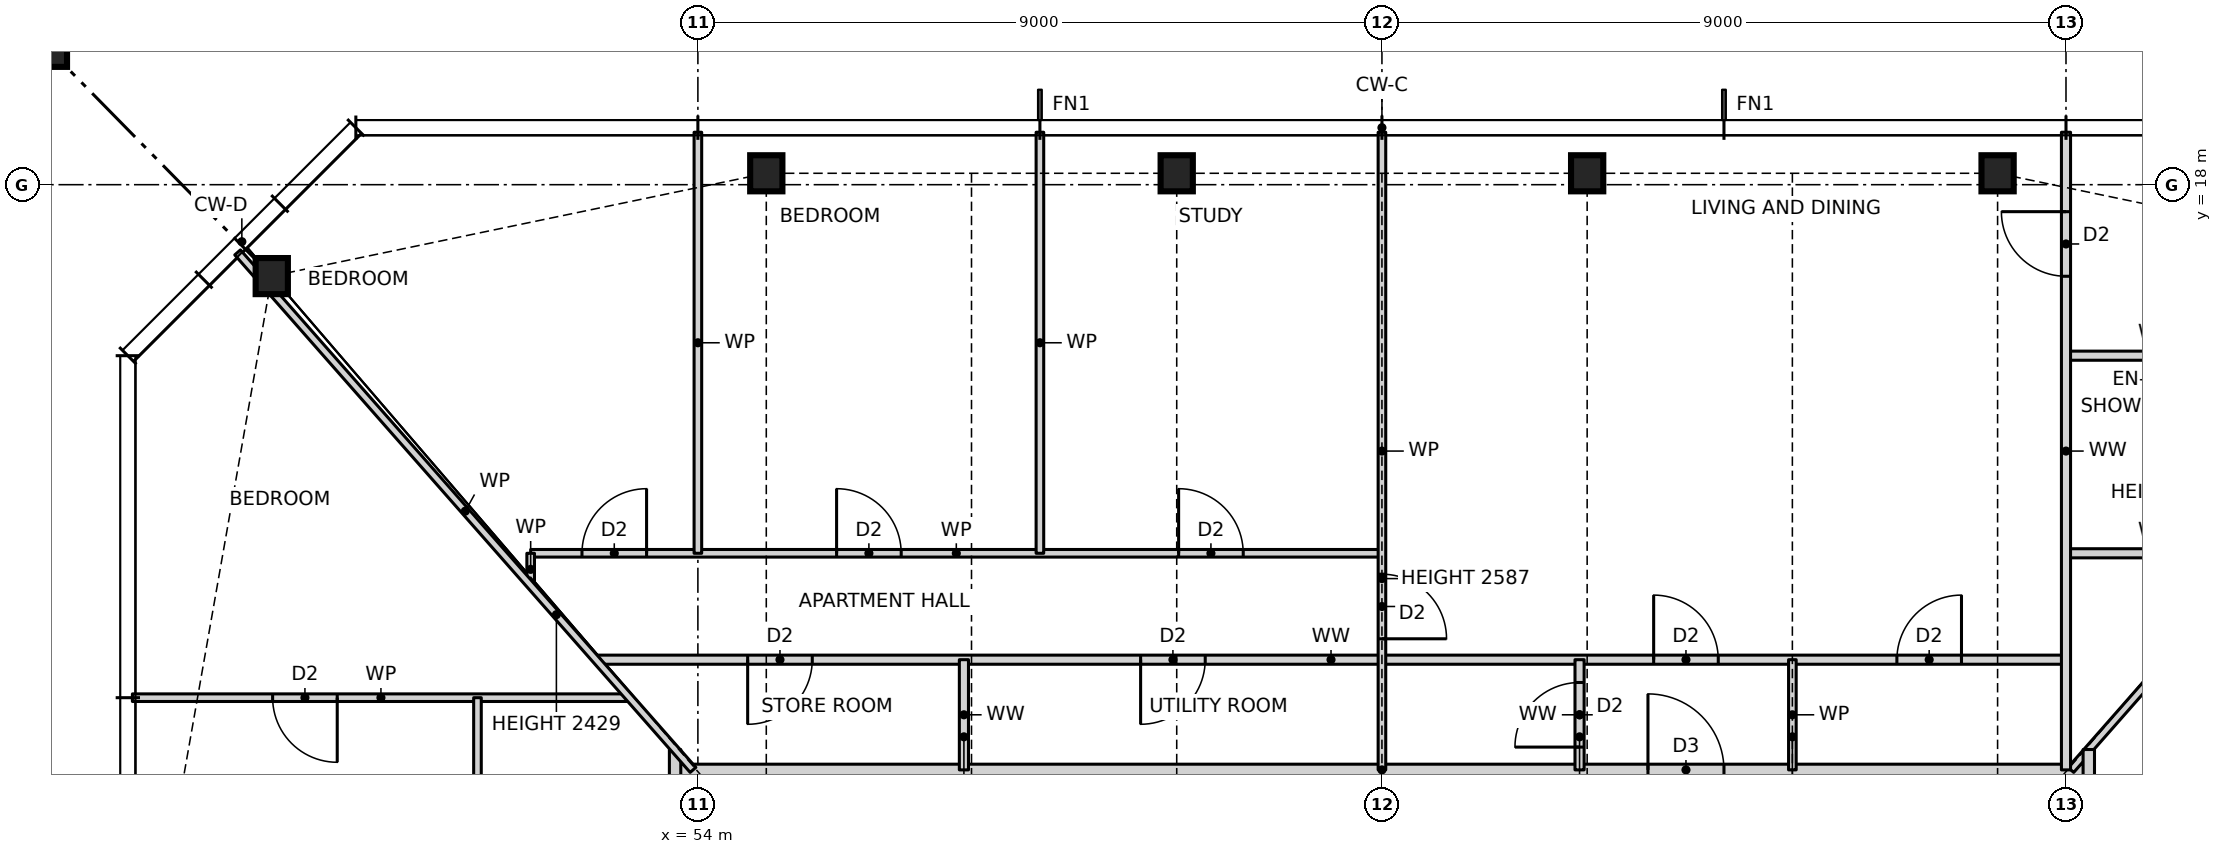
"""IFC4 building model, lengths in metres.
Left out: names, types, materials, properties, quantities, classifications, styles, units other than length and angle.
Written with IfcOpenShell. Run it as: python <this file> out.ifc"""

import sys

from ifc_helpers import new_model, si_unit, direction, frame, frame_2d, origin, origin_2d, place, context, subcontext, project, spatial, rectangle, hollow_rectangle, i_section, extrude, element, fill, save


model = new_model("IFC4")
c1 = context("Model", 3, precision=1e-05, world=origin(), true_north=direction((0.0, 1.0)))
c2 = subcontext(c1, "Body", "Model", "MODEL_VIEW")
j1 = project(units=[si_unit("LENGTHUNIT", "METRE"), si_unit("PLANEANGLEUNIT", "RADIAN")], contexts=[c1])
p1 = place(None, origin())
s1 = spatial("IfcSite", under=j1, at=p1, CompositionType="ELEMENT")
p2 = place(p1, origin())
s2 = spatial("IfcBuilding", under=s1, at=p2, CompositionType="ELEMENT")
p3 = place(p2, frame((0.0, 0.0, 46.5)))
s3 = spatial("IfcBuildingStorey", under=s2, at=p3, CompositionType="ELEMENT", Elevation=46.5)
for number, where, z_axis, x_axis in (
    (1, (71.1, 18.15, 0.0), (0.0, 0.0, 1.0), (1.0, 0.0, 0.0)),
    (2, (65.7, 18.15, 0.0), (0.0, 0.0, 1.0), (1.0, 0.0, 0.0)),
    (3, (60.3, 18.15, 0.0), (0.0, 0.0, 1.0), (1.0, 0.0, 0.0)),
    (4, (54.9, 18.15, 0.0), (0.0, 0.0, 1.0), (1.0, 0.0, 0.0)),
    (5, (48.394, 16.797, 0.0), (0.0, 0.0, 1.0), (1.0, 0.0, 0.0)),
):
    element("IfcColumn", number, at=place(p3, frame(where, z_axis=z_axis, x_axis=x_axis)), inside=s3, PredefinedType="COLUMN", context=c2, shape_type="SweptSolid", body=[
        extrude(i_section(OverallWidth=0.424, OverallDepth=0.475, WebThickness=0.048, FlangeThickness=0.077, at=origin_2d()), origin(), (0.0, 0.0, 1.0), 3.5),
    ])
p4 = place(p3, frame((45.1, 20.15, 0.0), z_axis=(0.0, 0.0, 1.0), x_axis=(1.0, 0.0, 0.0)))
e6 = element("IfcColumn", 6, at=p4, inside=s3, PredefinedType="COLUMN", context=c2, shape_type="SweptSolid", body=[
    extrude(hollow_rectangle(XDim=1.2, YDim=1.2, WallThickness=0.07, at=origin_2d()), origin(), (0.0, 0.0, 1.0), 3.5),
])
p5 = place(p3, frame((53.7, 10.3, 0.0), z_axis=(0.0, 0.0, 1.0), x_axis=(1.0, 0.0, 0.0)))
e7 = element("IfcWall", 7, at=p5, inside=s3, PredefinedType="PARTITIONING", context=c2, shape_type="SweptSolid", body=[
    extrude(rectangle(XDim=18.6, YDim=0.15, at=frame_2d((9.3, 0.0))), origin(), (0.0, 0.0, 1.0), 3.27),
])
p6 = place(p5, frame((12.8, 0.0, 0.0)))
e8 = element("IfcOpeningElement", 8, at=p6, cuts=e7, PredefinedType="OPENING", context=c2, shape_type="SweptSolid", body=[
    extrude(rectangle(XDim=1.0, YDim=2.1, at=frame_2d((0.5, 1.05))), frame((0.0, 0.085, 0.0), z_axis=(0.0, -1.0, 0.0), x_axis=(1.0, 0.0, 0.0)), (0.0, 0.0, 1.0), 0.17),
])
p7 = place(p3, frame((46.56, 11.25, 0.0), z_axis=(0.0, 0.0, 1.0), x_axis=(1.0, 0.0, 0.0)))
e9 = element("IfcWall", 9, at=p7, inside=s3, PredefinedType="PARTITIONING", context=c2, shape_type="SweptSolid", body=[
    extrude(rectangle(XDim=6.54, YDim=0.1, at=frame_2d((3.27, 0.0))), origin(), (0.0, 0.0, 1.0), 3.27),
])
p8 = place(p7, frame((1.845, 0.0, 0.0)))
e10 = element("IfcOpeningElement", 10, at=p8, cuts=e9, PredefinedType="OPENING", context=c2, shape_type="SweptSolid", body=[
    extrude(rectangle(XDim=0.85, YDim=2.1, at=frame_2d((0.425, 1.05))), frame((0.0, 0.06, 0.0), z_axis=(0.0, -1.0, 0.0), x_axis=(1.0, 0.0, 0.0)), (0.0, 0.0, 1.0), 0.12),
])
p9 = place(p3, frame((52.66, 11.75, 0.0), z_axis=(0.0, 0.0, 1.0), x_axis=(1.0, 0.0, 0.0)))
e11 = element("IfcWall", 11, at=p9, inside=s3, PredefinedType="PARTITIONING", context=c2, shape_type="SweptSolid", body=[
    extrude(rectangle(XDim=19.34, YDim=0.12, at=frame_2d((9.67, 0.0))), origin(), (0.0, 0.0, 1.0), 3.27),
])
p10 = place(p9, frame((17.115, 0.0, 0.0)))
e12 = element("IfcOpeningElement", 12, at=p10, cuts=e11, PredefinedType="OPENING", context=c2, shape_type="SweptSolid", body=[
    extrude(rectangle(XDim=0.85, YDim=2.1, at=frame_2d((0.425, 1.05))), frame((0.0, 0.07, 0.0), z_axis=(0.0, -1.0, 0.0), x_axis=(1.0, 0.0, 0.0)), (0.0, 0.0, 1.0), 0.14),
])
p11 = place(p9, frame((13.915, 0.0, 0.0)))
e13 = element("IfcOpeningElement", 13, at=p11, cuts=e11, PredefinedType="OPENING", context=c2, shape_type="SweptSolid", body=[
    extrude(rectangle(XDim=0.85, YDim=2.1, at=frame_2d((0.425, 1.05))), frame((0.0, 0.07, 0.0), z_axis=(0.0, -1.0, 0.0), x_axis=(1.0, 0.0, 0.0)), (0.0, 0.0, 1.0), 0.14),
])
p12 = place(p9, frame((7.165, 0.0, 0.0)))
e14 = element("IfcOpeningElement", 14, at=p12, cuts=e11, PredefinedType="OPENING", context=c2, shape_type="SweptSolid", body=[
    extrude(rectangle(XDim=0.85, YDim=2.1, at=frame_2d((0.425, 1.05))), frame((0.0, 0.07, 0.0), z_axis=(0.0, -1.0, 0.0), x_axis=(1.0, 0.0, 0.0)), (0.0, 0.0, 1.0), 0.14),
])
p13 = place(p9, frame((1.995, 0.0, 0.0)))
e15 = element("IfcOpeningElement", 15, at=p13, cuts=e11, PredefinedType="OPENING", context=c2, shape_type="SweptSolid", body=[
    extrude(rectangle(XDim=0.85, YDim=2.1, at=frame_2d((0.425, 1.05))), frame((0.0, 0.07, 0.0), z_axis=(0.0, -1.0, 0.0), x_axis=(1.0, 0.0, 0.0)), (0.0, 0.0, 1.0), 0.14),
])
p14 = place(p3, frame((51.8, 13.15, 0.0), z_axis=(0.0, 0.0, 1.0), x_axis=(1.0, 0.0, 0.0)))
e16 = element("IfcWall", 16, at=p14, inside=s3, PredefinedType="PARTITIONING", context=c2, shape_type="SweptSolid", body=[
    extrude(rectangle(XDim=11.2, YDim=0.1, at=frame_2d((5.6, 0.0))), origin(), (0.0, 0.0, 1.0), 3.27),
])
p15 = place(p14, frame((8.525, 0.0, 0.0)))
e17 = element("IfcOpeningElement", 17, at=p15, cuts=e16, PredefinedType="OPENING", context=c2, shape_type="SweptSolid", body=[
    extrude(rectangle(XDim=0.85, YDim=2.1, at=frame_2d((0.425, 1.05))), frame((0.0, 0.06, 0.0), z_axis=(0.0, -1.0, 0.0), x_axis=(1.0, 0.0, 0.0)), (0.0, 0.0, 1.0), 0.12),
])
p16 = place(p14, frame((4.025, 0.0, 0.0)))
e18 = element("IfcOpeningElement", 18, at=p16, cuts=e16, PredefinedType="OPENING", context=c2, shape_type="SweptSolid", body=[
    extrude(rectangle(XDim=0.85, YDim=2.1, at=frame_2d((0.425, 1.05))), frame((0.0, 0.06, 0.0), z_axis=(0.0, -1.0, 0.0), x_axis=(1.0, 0.0, 0.0)), (0.0, 0.0, 1.0), 0.12),
])
p17 = place(p14, frame((0.675, 0.0, 0.0)))
e19 = element("IfcOpeningElement", 19, at=p17, cuts=e16, PredefinedType="OPENING", context=c2, shape_type="SweptSolid", body=[
    extrude(rectangle(XDim=0.85, YDim=2.1, at=frame_2d((0.425, 1.05))), frame((0.0, 0.06, 0.0), z_axis=(0.0, -1.0, 0.0), x_axis=(1.0, 0.0, 0.0)), (0.0, 0.0, 1.0), 0.12),
])
for number, where, z_axis, x_axis in (
    (20, (72.0, 13.15, 0.0), (0.0, 0.0, 1.0), (1.0, 0.0, 0.0)),
    (21, (72.0, 15.75, 0.0), (0.0, 0.0, 1.0), (1.0, 0.0, 0.0)),
):
    element("IfcWall", number, at=place(p3, frame(where, z_axis=z_axis, x_axis=x_axis)), inside=s3, PredefinedType="PARTITIONING", context=c2, shape_type="SweptSolid", body=[
        extrude(rectangle(XDim=2.4, YDim=0.12, at=frame_2d((1.2, 0.0))), origin(), (0.0, 0.0, 1.0), 3.27),
    ])
p18 = place(p3, frame((72.064, 10.3, 0.0), z_axis=(0.0, 0.0, 1.0), x_axis=(0.660700699661, 0.750649442461, 0.0)))
e22 = element("IfcWall", 22, at=p18, inside=s3, PredefinedType="PARTITIONING", context=c2, shape_type="SweptSolid", body=[
    extrude(rectangle(XDim=9.071, YDim=0.1, at=frame_2d((4.535, 0.0))), origin(), (0.0, 0.0, 1.0), 2.429),
])
p19 = place(p3, frame((72.3, -10.568, 0.0), z_axis=(0.0, 0.0, 1.0), x_axis=(0.0, 1.0, 0.0)))
e23 = element("IfcWall", 23, at=p19, inside=s3, PredefinedType="PARTITIONING", context=c2, shape_type="SweptSolid", body=[
    extrude(rectangle(XDim=21.136, YDim=0.15, at=frame_2d((10.568, 0.0))), origin(), (0.0, 0.0, 1.0), 3.27),
])
p20 = place(p19, frame((8.318, 0.0, 0.0)))
e24 = element("IfcOpeningElement", 24, at=p20, cuts=e23, PredefinedType="OPENING", context=c2, shape_type="SweptSolid", body=[
    extrude(rectangle(XDim=1.0, YDim=2.1, at=frame_2d((0.5, 1.05))), frame((0.0, 0.085, 0.0), z_axis=(0.0, -1.0, 0.0), x_axis=(1.0, 0.0, 0.0)), (0.0, 0.0, 1.0), 0.17),
])
p21 = place(p3, frame((72.0, 10.3, 0.0), z_axis=(0.0, 0.0, 1.0), x_axis=(0.0, 1.0, 0.0)))
e25 = element("IfcWall", 25, at=p21, inside=s3, PredefinedType="PARTITIONING", context=c2, shape_type="SweptSolid", body=[
    extrude(rectangle(XDim=8.39, YDim=0.12, at=frame_2d((4.195, 0.0))), origin(), (0.0, 0.0, 1.0), 3.27),
])
p22 = place(p21, frame((6.495, 0.0, 0.0)))
e26 = element("IfcOpeningElement", 26, at=p22, cuts=e25, PredefinedType="OPENING", context=c2, shape_type="SweptSolid", body=[
    extrude(rectangle(XDim=0.85, YDim=2.1, at=frame_2d((0.425, 1.05))), frame((0.0, 0.07, 0.0), z_axis=(0.0, -1.0, 0.0), x_axis=(1.0, 0.0, 0.0)), (0.0, 0.0, 1.0), 0.14),
])
p23 = place(p3, frame((68.4, 10.3, 0.0), z_axis=(0.0, 0.0, 1.0), x_axis=(0.0, 1.0, 0.0)))
e27 = element("IfcWall", 27, at=p23, inside=s3, PredefinedType="PARTITIONING", context=c2, shape_type="SweptSolid", body=[
    extrude(rectangle(XDim=1.45, YDim=0.1, at=frame_2d((0.725, 0.0))), origin(), (0.0, 0.0, 1.0), 2.587),
])
p24 = place(p3, frame((65.6, 10.3, 0.0), z_axis=(0.0, 0.0, 1.0), x_axis=(0.0, 1.0, 0.0)))
e28 = element("IfcWall", 28, at=p24, inside=s3, PredefinedType="PARTITIONING", context=c2, shape_type="SweptSolid", body=[
    extrude(rectangle(XDim=1.45, YDim=0.12, at=frame_2d((0.725, 0.0))), origin(), (0.0, 0.0, 1.0), 2.508),
])
p25 = place(p24, frame((0.3, 0.0, 0.0)))
e29 = element("IfcOpeningElement", 29, at=p25, cuts=e28, PredefinedType="OPENING", context=c2, shape_type="SweptSolid", body=[
    extrude(rectangle(XDim=0.85, YDim=2.1, at=frame_2d((0.425, 1.05))), frame((0.0, 0.07, 0.0), z_axis=(0.0, -1.0, 0.0), x_axis=(1.0, 0.0, 0.0)), (0.0, 0.0, 1.0), 0.14),
])
p26 = place(p3, frame((63.0, 10.3, 0.0), z_axis=(0.0, 0.0, 1.0), x_axis=(0.0, 1.0, 0.0)))
e30 = element("IfcWall", 30, at=p26, inside=s3, PredefinedType="PARTITIONING", context=c2, shape_type="SweptSolid", body=[
    extrude(rectangle(XDim=8.39, YDim=0.1, at=frame_2d((4.195, 0.0))), origin(), (0.0, 0.0, 1.0), 2.587),
])
p27 = place(p26, frame((1.725, 0.0, 0.0)))
e31 = element("IfcOpeningElement", 31, at=p27, cuts=e30, PredefinedType="OPENING", context=c2, shape_type="SweptSolid", body=[
    extrude(rectangle(XDim=0.85, YDim=2.1, at=frame_2d((0.425, 1.05))), frame((0.0, 0.06, 0.0), z_axis=(0.0, -1.0, 0.0), x_axis=(1.0, 0.0, 0.0)), (0.0, 0.0, 1.0), 0.12),
])
p28 = place(p3, frame((58.5, 13.15, 0.0), z_axis=(0.0, 0.0, 1.0), x_axis=(0.0, 1.0, 0.0)))
e32 = element("IfcWall", 32, at=p28, inside=s3, PredefinedType="PARTITIONING", context=c2, shape_type="SweptSolid", body=[
    extrude(rectangle(XDim=5.54, YDim=0.1, at=frame_2d((2.77, 0.0))), origin(), (0.0, 0.0, 1.0), 3.27),
])
p29 = place(p3, frame((57.5, 10.3, 0.0), z_axis=(0.0, 0.0, 1.0), x_axis=(0.0, 1.0, 0.0)))
e33 = element("IfcWall", 33, at=p29, inside=s3, PredefinedType="PARTITIONING", context=c2, shape_type="SweptSolid", body=[
    extrude(rectangle(XDim=1.45, YDim=0.12, at=frame_2d((0.725, 0.0))), origin(), (0.0, 0.0, 1.0), 2.587),
])
p30 = place(p3, frame((54.0, 13.15, 0.0), z_axis=(0.0, 0.0, 1.0), x_axis=(0.0, 1.0, 0.0)))
e34 = element("IfcWall", 34, at=p30, inside=s3, PredefinedType="PARTITIONING", context=c2, shape_type="SweptSolid", body=[
    extrude(rectangle(XDim=5.54, YDim=0.1, at=frame_2d((2.77, 0.0))), origin(), (0.0, 0.0, 1.0), 3.27),
])
p31 = place(p3, frame((53.7, -10.568, 0.0), z_axis=(0.0, 0.0, 1.0), x_axis=(0.0, 1.0, 0.0)))
e35 = element("IfcWall", 35, at=p31, inside=s3, PredefinedType="PARTITIONING", context=c2, shape_type="SweptSolid", body=[
    extrude(rectangle(XDim=21.136, YDim=0.15, at=frame_2d((10.568, 0.0))), origin(), (0.0, 0.0, 1.0), 3.27),
])
p32 = place(p31, frame((16.318, 0.0, 0.0)))
e36 = element("IfcOpeningElement", 36, at=p32, cuts=e35, PredefinedType="OPENING", context=c2, shape_type="SweptSolid", body=[
    extrude(rectangle(XDim=1.0, YDim=2.1, at=frame_2d((0.5, 1.05))), frame((0.0, 0.085, 0.0), z_axis=(0.0, -1.0, 0.0), x_axis=(1.0, 0.0, 0.0)), (0.0, 0.0, 1.0), 0.17),
])
p33 = place(p31, frame((10.918, 0.0, 0.0)))
e37 = element("IfcOpeningElement", 37, at=p33, cuts=e35, PredefinedType="OPENING", context=c2, shape_type="SweptSolid", body=[
    extrude(rectangle(XDim=1.0, YDim=2.1, at=frame_2d((0.5, 1.05))), frame((0.0, 0.085, 0.0), z_axis=(0.0, -1.0, 0.0), x_axis=(1.0, 0.0, 0.0)), (0.0, 0.0, 1.0), 0.17),
])
p34 = place(p3, frame((51.8, 12.727, 0.0), z_axis=(0.0, 0.0, 1.0), x_axis=(0.0, 1.0, 0.0)))
e38 = element("IfcWall", 38, at=p34, inside=s3, PredefinedType="PARTITIONING", context=c2, shape_type="SweptSolid", body=[
    extrude(rectangle(XDim=0.423, YDim=0.1, at=frame_2d((0.211, 0.0))), origin(), (0.0, 0.0, 1.0), 3.27),
])
p35 = place(p3, frame((51.1, 2.25, 0.0), z_axis=(0.0, 0.0, 1.0), x_axis=(0.0, 1.0, 0.0)))
e39 = element("IfcWall", 39, at=p35, inside=s3, PredefinedType="PARTITIONING", context=c2, shape_type="SweptSolid", body=[
    extrude(rectangle(XDim=9.0, YDim=0.1, at=frame_2d((4.5, 0.0))), origin(), (0.0, 0.0, 1.0), 3.27),
])
p36 = place(p35, frame((6.775, 0.0, 0.0)))
e40 = element("IfcOpeningElement", 40, at=p36, cuts=e39, PredefinedType="OPENING", context=c2, shape_type="SweptSolid", body=[
    extrude(rectangle(XDim=0.85, YDim=2.1, at=frame_2d((0.425, 1.05))), frame((0.0, 0.06, 0.0), z_axis=(0.0, -1.0, 0.0), x_axis=(1.0, 0.0, 0.0)), (0.0, 0.0, 1.0), 0.12),
])
p37 = place(p35, frame((3.575, 0.0, 0.0)))
e41 = element("IfcOpeningElement", 41, at=p37, cuts=e39, PredefinedType="OPENING", context=c2, shape_type="SweptSolid", body=[
    extrude(rectangle(XDim=0.85, YDim=2.1, at=frame_2d((0.425, 1.05))), frame((0.0, 0.06, 0.0), z_axis=(0.0, -1.0, 0.0), x_axis=(1.0, 0.0, 0.0)), (0.0, 0.0, 1.0), 0.12),
])
p38 = place(p3, frame((53.936, 10.3, 0.0), z_axis=(0.0, 0.0, 1.0), x_axis=(-0.660638210404, 0.750704439146, 0.0)))
e42 = element("IfcWall", 42, at=p38, inside=s3, PredefinedType="PARTITIONING", context=c2, shape_type="SweptSolid", body=[
    extrude(rectangle(XDim=9.07, YDim=0.1, at=frame_2d((4.535, 0.0))), origin(), (0.0, 0.0, 1.0), 2.429),
])
p39 = place(p10, origin())
e43 = element("IfcDoor", 43, at=p39, inside=s3, OperationType="SINGLE_SWING_RIGHT", PredefinedType="DOOR", context=c2, shape_type="SweptSolid", body=[
    extrude(rectangle(XDim=0.85, YDim=2.1, at=frame_2d((0.425, 1.05))), frame((0.0, 0.025, 0.0), z_axis=(0.0, -1.0, 0.0), x_axis=(1.0, 0.0, 0.0)), (0.0, 0.0, 1.0), 0.05),
])
fill(e12, e43)
p40 = place(p6, origin())
e44 = element("IfcDoor", 44, at=p40, inside=s3, OperationType="SINGLE_SWING_LEFT", PredefinedType="DOOR", context=c2, shape_type="SweptSolid", body=[
    extrude(rectangle(XDim=1.0, YDim=2.1, at=frame_2d((0.5, 1.05))), frame((0.0, 0.025, 0.0), z_axis=(0.0, -1.0, 0.0), x_axis=(1.0, 0.0, 0.0)), (0.0, 0.0, 1.0), 0.05),
])
fill(e8, e44)
p41 = place(p11, origin())
e45 = element("IfcDoor", 45, at=p41, inside=s3, OperationType="SINGLE_SWING_LEFT", PredefinedType="DOOR", context=c2, shape_type="SweptSolid", body=[
    extrude(rectangle(XDim=0.85, YDim=2.1, at=frame_2d((0.425, 1.05))), frame((0.0, 0.025, 0.0), z_axis=(0.0, -1.0, 0.0), x_axis=(1.0, 0.0, 0.0)), (0.0, 0.0, 1.0), 0.05),
])
fill(e13, e45)
p42 = place(p25, origin())
e46 = element("IfcDoor", 46, at=p42, inside=s3, OperationType="SINGLE_SWING_LEFT", PredefinedType="DOOR", context=c2, shape_type="SweptSolid", body=[
    extrude(rectangle(XDim=0.85, YDim=2.1, at=frame_2d((0.425, 1.05))), frame((0.0, 0.025, 0.0), z_axis=(0.0, -1.0, 0.0), x_axis=(1.0, 0.0, 0.0)), (0.0, 0.0, 1.0), 0.05),
])
fill(e29, e46)
p43 = place(p22, origin())
e47 = element("IfcDoor", 47, at=p43, inside=s3, OperationType="SINGLE_SWING_RIGHT", PredefinedType="DOOR", context=c2, shape_type="SweptSolid", body=[
    extrude(rectangle(XDim=0.85, YDim=2.1, at=frame_2d((0.425, 1.05))), frame((0.0, 0.025, 0.0), z_axis=(0.0, -1.0, 0.0), x_axis=(1.0, 0.0, 0.0)), (0.0, 0.0, 1.0), 0.05),
])
fill(e26, e47)
p44 = place(p27, frame((0.85, 0.0, 0.0), z_axis=(0.0, 0.0, 1.0), x_axis=(-1.0, 0.0, 0.0)))
e48 = element("IfcDoor", 48, at=p44, inside=s3, OperationType="SINGLE_SWING_RIGHT", PredefinedType="DOOR", context=c2, shape_type="SweptSolid", body=[
    extrude(rectangle(XDim=0.85, YDim=2.1, at=frame_2d((0.425, 1.05))), frame((0.0, 0.025, 0.0), z_axis=(0.0, -1.0, 0.0), x_axis=(1.0, 0.0, 0.0)), (0.0, 0.0, 1.0), 0.05),
])
fill(e31, e48)
p45 = place(p15, origin())
e49 = element("IfcDoor", 49, at=p45, inside=s3, OperationType="SINGLE_SWING_LEFT", PredefinedType="DOOR", context=c2, shape_type="SweptSolid", body=[
    extrude(rectangle(XDim=0.85, YDim=2.1, at=frame_2d((0.425, 1.05))), frame((0.0, 0.025, 0.0), z_axis=(0.0, -1.0, 0.0), x_axis=(1.0, 0.0, 0.0)), (0.0, 0.0, 1.0), 0.05),
])
fill(e17, e49)
p46 = place(p16, origin())
e50 = element("IfcDoor", 50, at=p46, inside=s3, OperationType="SINGLE_SWING_LEFT", PredefinedType="DOOR", context=c2, shape_type="SweptSolid", body=[
    extrude(rectangle(XDim=0.85, YDim=2.1, at=frame_2d((0.425, 1.05))), frame((0.0, 0.025, 0.0), z_axis=(0.0, -1.0, 0.0), x_axis=(1.0, 0.0, 0.0)), (0.0, 0.0, 1.0), 0.05),
])
fill(e18, e50)
p47 = place(p17, origin())
e51 = element("IfcDoor", 51, at=p47, inside=s3, OperationType="SINGLE_SWING_RIGHT", PredefinedType="DOOR", context=c2, shape_type="SweptSolid", body=[
    extrude(rectangle(XDim=0.85, YDim=2.1, at=frame_2d((0.425, 1.05))), frame((0.0, 0.025, 0.0), z_axis=(0.0, -1.0, 0.0), x_axis=(1.0, 0.0, 0.0)), (0.0, 0.0, 1.0), 0.05),
])
fill(e19, e51)
p48 = place(p12, frame((0.85, 0.0, 0.0), z_axis=(0.0, 0.0, 1.0), x_axis=(-1.0, 0.0, 0.0)))
e52 = element("IfcDoor", 52, at=p48, inside=s3, OperationType="SINGLE_SWING_RIGHT", PredefinedType="DOOR", context=c2, shape_type="SweptSolid", body=[
    extrude(rectangle(XDim=0.85, YDim=2.1, at=frame_2d((0.425, 1.05))), frame((0.0, 0.025, 0.0), z_axis=(0.0, -1.0, 0.0), x_axis=(1.0, 0.0, 0.0)), (0.0, 0.0, 1.0), 0.05),
])
fill(e14, e52)
p49 = place(p13, frame((0.85, 0.0, 0.0), z_axis=(0.0, 0.0, 1.0), x_axis=(-1.0, 0.0, 0.0)))
e53 = element("IfcDoor", 53, at=p49, inside=s3, OperationType="SINGLE_SWING_RIGHT", PredefinedType="DOOR", context=c2, shape_type="SweptSolid", body=[
    extrude(rectangle(XDim=0.85, YDim=2.1, at=frame_2d((0.425, 1.05))), frame((0.0, 0.025, 0.0), z_axis=(0.0, -1.0, 0.0), x_axis=(1.0, 0.0, 0.0)), (0.0, 0.0, 1.0), 0.05),
])
fill(e15, e53)
p50 = place(p8, frame((0.85, 0.0, 0.0), z_axis=(0.0, 0.0, 1.0), x_axis=(-1.0, 0.0, 0.0)))
e54 = element("IfcDoor", 54, at=p50, inside=s3, OperationType="SINGLE_SWING_LEFT", PredefinedType="DOOR", context=c2, shape_type="SweptSolid", body=[
    extrude(rectangle(XDim=0.85, YDim=2.1, at=frame_2d((0.425, 1.05))), frame((0.0, 0.025, 0.0), z_axis=(0.0, -1.0, 0.0), x_axis=(1.0, 0.0, 0.0)), (0.0, 0.0, 1.0), 0.05),
])
fill(e10, e54)
save(model, sys.argv[1])
